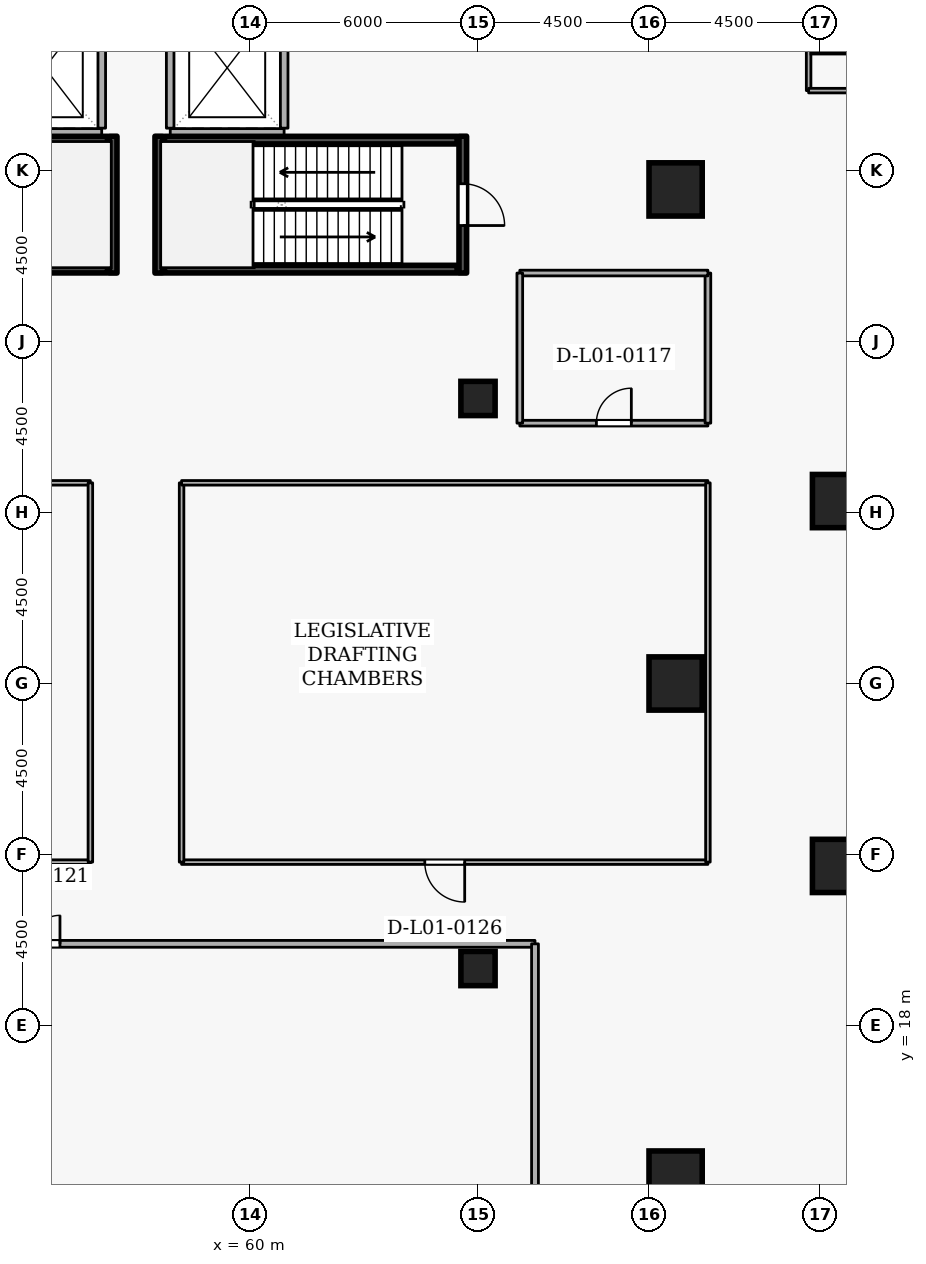
"""IFC4 building model, lengths in metres.
Left out: names, types, materials, properties, quantities, classifications, styles, units other than length and angle.
Written with IfcOpenShell. Run it as: python <this file> out.ifc"""

import sys

from ifc_helpers import new_model, si_unit, direction, frame, frame_2d, origin, origin_2d, place, context, subcontext, project, spatial, rectangle, extrude, element, fill, save


model = new_model("IFC4")
c1 = context("Model", 3, precision=1e-05, world=origin(), true_north=direction((0.0, 1.0)))
c2 = subcontext(c1, "Body", "Model", "MODEL_VIEW")
j1 = project(units=[si_unit("LENGTHUNIT", "METRE"), si_unit("PLANEANGLEUNIT", "RADIAN")], contexts=[c1])
p1 = place(None, origin())
s1 = spatial("IfcSite", under=j1, at=p1, CompositionType="ELEMENT")
p2 = place(p1, origin())
s2 = spatial("IfcBuilding", under=s1, at=p2, CompositionType="ELEMENT")
p3 = place(p2, frame((0.0, 0.0, 4.8)))
s3 = spatial("IfcBuildingStorey", under=s2, at=p3, CompositionType="ELEMENT", Elevation=4.8)
for number, where, z_axis, x_axis in (
    (1, (71.2, 14.0, 0.0), (0.0, 0.0, 1.0), (1.0, 0.0, 0.0)),
    (2, (71.2, 27.0, 0.0), (0.0, 0.0, 1.0), (1.0, 0.0, 0.0)),
    (3, (71.2, 40.0, 0.0), (0.0, 0.0, 1.0), (1.0, 0.0, 0.0)),
    (4, (75.5, 22.2, 0.0), (0.0, 0.0, 1.0), (1.0, 0.0, 0.0)),
    (5, (75.5, 31.8, 0.0), (0.0, 0.0, 1.0), (1.0, 0.0, 0.0)),
):
    element("IfcColumn", number, at=place(p3, frame(where, z_axis=z_axis, x_axis=x_axis)), inside=s3, PredefinedType="COLUMN", context=c2, shape_type="SweptSolid", body=[
        extrude(rectangle(XDim=1.4, YDim=1.4, at=origin_2d()), origin(), (0.0, 0.0, 1.0), 4.8),
    ])
for number, where, z_axis, x_axis in (
    (6, (66.0, 19.5, 0.0), (0.0, 0.0, 1.0), (1.0, 0.0, 0.0)),
    (7, (66.0, 34.5, 0.0), (0.0, 0.0, 1.0), (1.0, 0.0, 0.0)),
):
    element("IfcColumn", number, at=place(p3, frame(where, z_axis=z_axis, x_axis=x_axis)), inside=s3, PredefinedType="COLUMN", context=c2, shape_type="SweptSolid", body=[
        extrude(rectangle(XDim=0.9, YDim=0.9, at=origin_2d()), origin(), (0.0, 0.0, 1.0), 4.8),
    ])
p4 = place(p3, frame((53.102, 41.5, 0.0), z_axis=(0.0, 0.0, 1.0), x_axis=(1.0, 0.0, 0.0)))
e8 = element("IfcWall", 8, at=p4, inside=s3, PredefinedType="STANDARD", context=c2, shape_type="SweptSolid", body=[
    extrude(rectangle(XDim=2.996, YDim=0.2, at=frame_2d((1.498, 0.0))), origin(), (0.0, 0.0, 1.0), 4.46),
])
p5 = place(p3, frame((56.1, 41.612, 0.0), z_axis=(0.0, 0.0, 1.0), x_axis=(0.0, 1.0, 0.0)))
e9 = element("IfcWall", 9, at=p5, inside=s3, PredefinedType="STANDARD", context=c2, shape_type="SweptSolid", body=[
    extrude(rectangle(XDim=3.286, YDim=0.2, at=frame_2d((1.643, 0.0))), origin(), (0.0, 0.0, 1.0), 4.46),
])
p6 = place(p3, frame((57.902, 41.5, 0.0), z_axis=(0.0, 0.0, 1.0), x_axis=(1.0, 0.0, 0.0)))
e10 = element("IfcWall", 10, at=p6, inside=s3, PredefinedType="STANDARD", context=c2, shape_type="SweptSolid", body=[
    extrude(rectangle(XDim=2.996, YDim=0.2, at=frame_2d((1.498, 0.0))), origin(), (0.0, 0.0, 1.0), 4.46),
])
for number, where, z_axis, x_axis in (
    (11, (60.9, 41.612, 0.0), (0.0, 0.0, 1.0), (0.0, 1.0, 0.0)),
    (12, (57.9, 41.612, 0.0), (0.0, 0.0, 1.0), (0.0, 1.0, 0.0)),
):
    element("IfcWall", number, at=place(p3, frame(where, z_axis=z_axis, x_axis=x_axis)), inside=s3, PredefinedType="STANDARD", context=c2, shape_type="SweptSolid", body=[
        extrude(rectangle(XDim=3.286, YDim=0.2, at=frame_2d((1.643, 0.0))), origin(), (0.0, 0.0, 1.0), 4.46),
    ])
p7 = place(p3, frame((56.4, 41.4, 0.0), z_axis=(0.0, 0.0, 1.0), x_axis=(0.0, -1.0, 0.0)))
e13 = element("IfcWall", 13, at=p7, inside=s3, PredefinedType="SHEAR", context=c2, shape_type="SweptSolid", body=[
    extrude(rectangle(XDim=3.6, YDim=0.2, at=frame_2d((1.8, 0.0))), origin(), (0.0, 0.0, 1.0), 4.8),
])
for number, where, z_axis, x_axis in (
    (14, (56.25, 41.297, 0.0), (0.0, 0.0, 1.0), (-1.0, 0.0, 0.0)),
    (15, (48.55, 37.903, 0.0), (0.0, 0.0, 1.0), (1.0, 0.0, 0.0)),
):
    element("IfcWall", number, at=place(p3, frame(where, z_axis=z_axis, x_axis=x_axis)), inside=s3, PredefinedType="SHEAR", context=c2, shape_type="SweptSolid", body=[
        extrude(rectangle(XDim=7.7, YDim=0.2, at=frame_2d((3.85, 0.0))), origin(), (0.0, 0.0, 1.0), 4.8),
    ])
p8 = place(p3, frame((65.6, 41.4, 0.0), z_axis=(0.0, 0.0, 1.0), x_axis=(0.0, -1.0, 0.0)))
e16 = element("IfcWall", 16, at=p8, inside=s3, PredefinedType="SHEAR", context=c2, shape_type="SweptSolid", body=[
    extrude(rectangle(XDim=3.6, YDim=0.2, at=frame_2d((1.8, 0.0))), origin(), (0.0, 0.0, 1.0), 4.8),
])
p9 = place(p8, frame((1.25, 0.0, 0.0)))
e17 = element("IfcOpeningElement", 17, at=p9, cuts=e16, PredefinedType="OPENING", context=c2, shape_type="SweptSolid", body=[
    extrude(rectangle(XDim=1.1, YDim=2.1, at=frame_2d((0.55, 1.05))), frame((0.0, 0.11, 0.0), z_axis=(0.0, -1.0, 0.0), x_axis=(1.0, 0.0, 0.0)), (0.0, 0.0, 1.0), 0.22),
])
p10 = place(p3, frame((57.6, 37.8, 0.0), z_axis=(0.0, 0.0, 1.0), x_axis=(0.0, 1.0, 0.0)))
e18 = element("IfcWall", 18, at=p10, inside=s3, PredefinedType="SHEAR", context=c2, shape_type="SweptSolid", body=[
    extrude(rectangle(XDim=3.6, YDim=0.2, at=frame_2d((1.8, 0.0))), origin(), (0.0, 0.0, 1.0), 4.8),
])
for number, where, z_axis, x_axis in (
    (19, (57.75, 37.903, 0.0), (0.0, 0.0, 1.0), (1.0, 0.0, 0.0)),
    (20, (65.45, 41.297, 0.0), (0.0, 0.0, 1.0), (-1.0, 0.0, 0.0)),
):
    element("IfcWall", number, at=place(p3, frame(where, z_axis=z_axis, x_axis=x_axis)), inside=s3, PredefinedType="SHEAR", context=c2, shape_type="SweptSolid", body=[
        extrude(rectangle(XDim=7.7, YDim=0.2, at=frame_2d((3.85, 0.0))), origin(), (0.0, 0.0, 1.0), 4.8),
    ])
p11 = place(p3, frame((67.1, 33.85, 0.0), z_axis=(0.0, 0.0, 1.0), x_axis=(1.0, 0.0, 0.0)))
e21 = element("IfcWall", 21, at=p11, inside=s3, PredefinedType="PARTITIONING", context=c2, shape_type="SweptSolid", body=[
    extrude(rectangle(XDim=4.95, YDim=0.15, at=frame_2d((2.475, 0.0))), origin(), (0.0, 0.0, 1.0), 4.46),
])
p12 = place(p11, frame((2.015, 0.0, 0.0)))
e22 = element("IfcOpeningElement", 22, at=p12, cuts=e21, PredefinedType="OPENING", context=c2, shape_type="SweptSolid", body=[
    extrude(rectangle(XDim=0.92, YDim=2.08, at=frame_2d((0.46, 1.04))), frame((0.0, 0.085, 0.0), z_axis=(0.0, -1.0, 0.0), x_axis=(1.0, 0.0, 0.0)), (0.0, 0.0, 1.0), 0.17),
])
p13 = place(p3, frame((72.05, 33.85, 0.0), z_axis=(0.0, 0.0, 1.0), x_axis=(0.0, 1.0, 0.0)))
e23 = element("IfcWall", 23, at=p13, inside=s3, PredefinedType="PARTITIONING", context=c2, shape_type="SweptSolid", body=[
    extrude(rectangle(XDim=3.95, YDim=0.15, at=frame_2d((1.975, 0.0))), origin(), (0.0, 0.0, 1.0), 4.46),
])
p14 = place(p3, frame((72.05, 37.8, 0.0), z_axis=(0.0, 0.0, 1.0), x_axis=(-1.0, 0.0, 0.0)))
e24 = element("IfcWall", 24, at=p14, inside=s3, PredefinedType="PARTITIONING", context=c2, shape_type="SweptSolid", body=[
    extrude(rectangle(XDim=4.95, YDim=0.15, at=frame_2d((2.475, 0.0))), origin(), (0.0, 0.0, 1.0), 4.46),
])
p15 = place(p3, frame((67.1, 37.8, 0.0), z_axis=(0.0, 0.0, 1.0), x_axis=(0.0, -1.0, 0.0)))
e25 = element("IfcWall", 25, at=p15, inside=s3, PredefinedType="PARTITIONING", context=c2, shape_type="SweptSolid", body=[
    extrude(rectangle(XDim=3.95, YDim=0.15, at=frame_2d((1.975, 0.0))), origin(), (0.0, 0.0, 1.0), 4.46),
])
p16 = place(p3, frame((41.0, 20.15, 0.0), z_axis=(0.0, 0.0, 1.0), x_axis=(1.0, 0.0, 0.0)))
e26 = element("IfcWall", 26, at=p16, inside=s3, PredefinedType="PARTITIONING", context=c2, shape_type="SweptSolid", body=[
    extrude(rectangle(XDim=26.5, YDim=0.18, at=frame_2d((13.25, 0.0))), origin(), (0.0, 0.0, 1.0), 4.46),
])
p17 = place(p16, frame((12.5, 0.0, 0.0)))
e27 = element("IfcOpeningElement", 27, at=p17, cuts=e26, PredefinedType="OPENING", context=c2, shape_type="SweptSolid", body=[
    extrude(rectangle(XDim=1.5, YDim=2.15, at=frame_2d((0.75, 1.075))), frame((0.0, 0.1, 0.0), z_axis=(0.0, -1.0, 0.0), x_axis=(1.0, 0.0, 0.0)), (0.0, 0.0, 1.0), 0.2),
])
p18 = place(p3, frame((67.5, 20.15, 0.0), z_axis=(0.0, 0.0, 1.0), x_axis=(0.0, -1.0, 0.0)))
e28 = element("IfcWall", 28, at=p18, inside=s3, PredefinedType="PARTITIONING", context=c2, shape_type="SweptSolid", body=[
    extrude(rectangle(XDim=13.83, YDim=0.18, at=frame_2d((6.915, 0.0))), origin(), (0.0, 0.0, 1.0), 4.46),
])
p19 = place(p3, frame((55.8, 22.3, 0.0), z_axis=(0.0, 0.0, 1.0), x_axis=(-1.0, 0.0, 0.0)))
e29 = element("IfcWall", 29, at=p19, inside=s3, PredefinedType="PARTITIONING", context=c2, shape_type="SweptSolid", body=[
    extrude(rectangle(XDim=17.8, YDim=0.12, at=frame_2d((8.9, 0.0))), origin(), (0.0, 0.0, 1.0), 4.46),
])
p20 = place(p19, frame((8.375, 0.0, 0.0)))
e30 = element("IfcOpeningElement", 30, at=p20, cuts=e29, PredefinedType="OPENING", context=c2, shape_type="SweptSolid", body=[
    extrude(rectangle(XDim=1.05, YDim=2.1, at=frame_2d((0.525, 1.05))), frame((0.0, 0.07, 0.0), z_axis=(0.0, -1.0, 0.0), x_axis=(1.0, 0.0, 0.0)), (0.0, 0.0, 1.0), 0.14),
])
p21 = place(p3, frame((38.0, 32.28, 0.0), z_axis=(0.0, 0.0, 1.0), x_axis=(1.0, 0.0, 0.0)))
e31 = element("IfcWall", 31, at=p21, inside=s3, PredefinedType="PARTITIONING", context=c2, shape_type="SweptSolid", body=[
    extrude(rectangle(XDim=17.8, YDim=0.12, at=frame_2d((8.9, 0.0))), origin(), (0.0, 0.0, 1.0), 4.46),
])
p22 = place(p3, frame((55.8, 32.28, 0.0), z_axis=(0.0, 0.0, 1.0), x_axis=(0.0, -1.0, 0.0)))
e32 = element("IfcWall", 32, at=p22, inside=s3, PredefinedType="PARTITIONING", context=c2, shape_type="SweptSolid", body=[
    extrude(rectangle(XDim=9.98, YDim=0.12, at=frame_2d((4.99, 0.0))), origin(), (0.0, 0.0, 1.0), 4.46),
])
p23 = place(p3, frame((72.05, 22.3, 0.0), z_axis=(0.0, 0.0, 1.0), x_axis=(-1.0, 0.0, 0.0)))
e33 = element("IfcWall", 33, at=p23, inside=s3, PredefinedType="PARTITIONING", context=c2, shape_type="SweptSolid", body=[
    extrude(rectangle(XDim=13.85, YDim=0.12, at=frame_2d((6.925, 0.0))), origin(), (0.0, 0.0, 1.0), 4.46),
])
p24 = place(p23, frame((6.4, 0.0, 0.0)))
e34 = element("IfcOpeningElement", 34, at=p24, cuts=e33, PredefinedType="OPENING", context=c2, shape_type="SweptSolid", body=[
    extrude(rectangle(XDim=1.05, YDim=2.1, at=frame_2d((0.525, 1.05))), frame((0.0, 0.07, 0.0), z_axis=(0.0, -1.0, 0.0), x_axis=(1.0, 0.0, 0.0)), (0.0, 0.0, 1.0), 0.14),
])
p25 = place(p3, frame((58.2, 22.3, 0.0), z_axis=(0.0, 0.0, 1.0), x_axis=(0.0, 1.0, 0.0)))
e35 = element("IfcWall", 35, at=p25, inside=s3, PredefinedType="PARTITIONING", context=c2, shape_type="SweptSolid", body=[
    extrude(rectangle(XDim=9.98, YDim=0.12, at=frame_2d((4.99, 0.0))), origin(), (0.0, 0.0, 1.0), 4.46),
])
p26 = place(p3, frame((58.2, 32.28, 0.0), z_axis=(0.0, 0.0, 1.0), x_axis=(1.0, 0.0, 0.0)))
e36 = element("IfcWall", 36, at=p26, inside=s3, PredefinedType="PARTITIONING", context=c2, shape_type="SweptSolid", body=[
    extrude(rectangle(XDim=13.85, YDim=0.12, at=frame_2d((6.925, 0.0))), origin(), (0.0, 0.0, 1.0), 4.46),
])
p27 = place(p3, frame((72.05, 32.28, 0.0), z_axis=(0.0, 0.0, 1.0), x_axis=(0.0, -1.0, 0.0)))
e37 = element("IfcWall", 37, at=p27, inside=s3, PredefinedType="PARTITIONING", context=c2, shape_type="SweptSolid", body=[
    extrude(rectangle(XDim=9.98, YDim=0.12, at=frame_2d((4.99, 0.0))), origin(), (0.0, 0.0, 1.0), 4.46),
])
p28 = place(p3, frame((74.7, 42.6, 0.0), z_axis=(0.0, 0.0, 1.0), x_axis=(0.0, 1.0, 0.0)))
e38 = element("IfcWall", 38, at=p28, inside=s3, PredefinedType="PARTITIONING", context=c2, shape_type="SweptSolid", body=[
    extrude(rectangle(XDim=6.58, YDim=0.12, at=frame_2d((3.29, 0.0))), origin(), (0.0, 0.0, 1.0), 4.46),
])
p29 = place(p3, frame((93.3, 42.6, 0.0), z_axis=(0.0, 0.0, 1.0), x_axis=(-1.0, 0.0, 0.0)))
e39 = element("IfcWall", 39, at=p29, inside=s3, PredefinedType="PARTITIONING", context=c2, shape_type="SweptSolid", body=[
    extrude(rectangle(XDim=18.6, YDim=0.12, at=frame_2d((9.3, 0.0))), origin(), (0.0, 0.0, 1.0), 4.46),
])
p30 = place(p29, frame((8.775, 0.0, 0.0)))
e40 = element("IfcOpeningElement", 40, at=p30, cuts=e39, PredefinedType="OPENING", context=c2, shape_type="SweptSolid", body=[
    extrude(rectangle(XDim=1.05, YDim=2.1, at=frame_2d((0.525, 1.05))), frame((0.0, 0.07, 0.0), z_axis=(0.0, -1.0, 0.0), x_axis=(1.0, 0.0, 0.0)), (0.0, 0.0, 1.0), 0.14),
])
p31 = place(p9, origin())
e41 = element("IfcDoor", 41, at=p31, inside=s3, OperationType="SINGLE_SWING_RIGHT", PredefinedType="DOOR", context=c2, shape_type="SweptSolid", body=[
    extrude(rectangle(XDim=1.1, YDim=2.1, at=frame_2d((0.55, 1.05))), frame((0.0, 0.025, 0.0), z_axis=(0.0, -1.0, 0.0), x_axis=(1.0, 0.0, 0.0)), (0.0, 0.0, 1.0), 0.05),
])
fill(e17, e41)
p32 = place(p12, origin())
e42 = element("IfcDoor", 42, at=p32, inside=s3, OperationType="SINGLE_SWING_RIGHT", PredefinedType="DOOR", context=c2, shape_type="SweptSolid", body=[
    extrude(rectangle(XDim=0.92, YDim=2.08, at=frame_2d((0.46, 1.04))), frame((0.0, 0.025, 0.0), z_axis=(0.0, -1.0, 0.0), x_axis=(1.0, 0.0, 0.0)), (0.0, 0.0, 1.0), 0.05),
])
fill(e22, e42)
p33 = place(p17, origin())
e43 = element("IfcDoor", 43, at=p33, inside=s3, OperationType="DOUBLE_DOOR_SINGLE_SWING", PredefinedType="DOOR", context=c2, shape_type="SweptSolid", body=[
    extrude(rectangle(XDim=1.5, YDim=2.15, at=frame_2d((0.75, 1.075))), frame((0.0, 0.025, 0.0), z_axis=(0.0, -1.0, 0.0), x_axis=(1.0, 0.0, 0.0)), (0.0, 0.0, 1.0), 0.05),
])
fill(e27, e43)
p34 = place(p24, origin())
e44 = element("IfcDoor", 44, at=p34, inside=s3, OperationType="SINGLE_SWING_LEFT", PredefinedType="DOOR", context=c2, shape_type="SweptSolid", body=[
    extrude(rectangle(XDim=1.05, YDim=2.1, at=frame_2d((0.525, 1.05))), frame((0.0, 0.025, 0.0), z_axis=(0.0, -1.0, 0.0), x_axis=(1.0, 0.0, 0.0)), (0.0, 0.0, 1.0), 0.05),
])
fill(e34, e44)
save(model, sys.argv[1])
